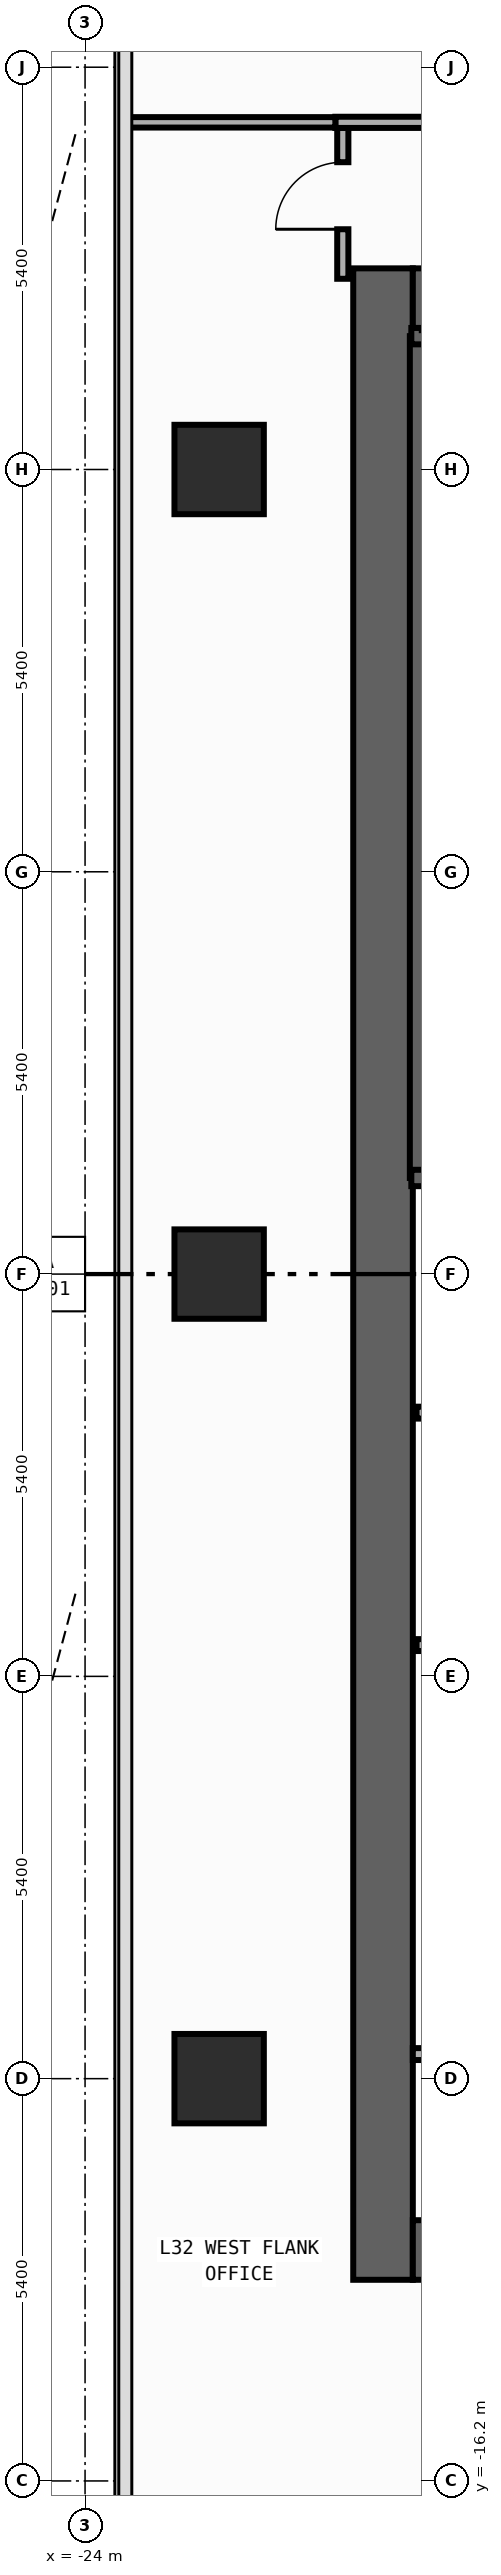
"""IFC4 building model, lengths in metres.
Left out: names, types, materials, properties, quantities, classifications, styles, units other than length and angle.
Written with IfcOpenShell. Run it as: python <this file> out.ifc"""

import sys

from ifc_helpers import new_model, si_unit, direction, frame, frame_2d, origin, origin_2d, place, context, subcontext, project, spatial, rectangle, extrude, element, fill, save


model = new_model("IFC4")
c1 = context("Model", 3, precision=1e-05, world=origin(), true_north=direction((0.0, 1.0)))
c2 = subcontext(c1, "Body", "Model", "MODEL_VIEW")
j1 = project(units=[si_unit("LENGTHUNIT", "METRE"), si_unit("PLANEANGLEUNIT", "RADIAN")], contexts=[c1])
p1 = place(None, origin())
s1 = spatial("IfcSite", under=j1, at=p1, CompositionType="ELEMENT")
p2 = place(p1, origin())
s2 = spatial("IfcBuilding", under=s1, at=p2, CompositionType="ELEMENT")
p3 = place(p2, frame((0.0, 0.0, 139.4)))
s3 = spatial("IfcBuildingStorey", under=s2, at=p3, CompositionType="ELEMENT", Elevation=139.4)
p4 = place(p3, frame((-20.0, -13.5, 0.0), z_axis=(0.0, 0.0, 1.0), x_axis=(0.0, 1.0, 0.0)))
e1 = element("IfcWall", 1, at=p4, inside=s3, PredefinedType="SHEAR", context=c2, shape_type="SweptSolid", body=[
    extrude(rectangle(XDim=27.0, YDim=0.8, at=frame_2d((13.5, 0.0))), origin(), (0.0, 0.0, 1.0), 3.94),
])
for number, where, z_axis, x_axis in (
    (2, (-19.6, -13.1, 0.0), (0.0, 0.0, 1.0), (1.0, 0.0, 0.0)),
    (3, (-19.6, 13.1, 0.0), (0.0, 0.0, 1.0), (1.0, 0.0, 0.0)),
):
    element("IfcWall", number, at=place(p3, frame(where, z_axis=z_axis, x_axis=x_axis)), inside=s3, PredefinedType="SHEAR", context=c2, shape_type="SweptSolid", body=[
        extrude(rectangle(XDim=6.8, YDim=0.8, at=frame_2d((3.4, 0.0))), origin(), (0.0, 0.0, 1.0), 3.94),
    ])
p5 = place(p3, frame((-19.53, 1.29, 0.0), z_axis=(0.0, 0.0, 1.0), x_axis=(0.0, 1.0, 0.0)))
e4 = element("IfcWall", 4, at=p5, inside=s3, PredefinedType="SHEAR", context=c2, shape_type="SweptSolid", body=[
    extrude(rectangle(XDim=11.3, YDim=0.22, at=frame_2d((5.65, 0.0))), origin(), (0.0, 0.0, 1.0), 3.94),
])
p6 = place(p3, frame((-19.62, 12.59, 0.0), z_axis=(0.0, 0.0, 1.0), x_axis=(1.0, 0.0, 0.0)))
e5 = element("IfcWall", 5, at=p6, inside=s3, PredefinedType="SHEAR", context=c2, shape_type="SweptSolid", body=[
    extrude(rectangle(XDim=3.915, YDim=0.22, at=frame_2d((1.958, 0.0))), origin(), (0.0, 0.0, 1.0), 3.94),
])
p7 = place(p3, frame((-19.62, 1.29, 0.0), z_axis=(0.0, 0.0, 1.0), x_axis=(1.0, 0.0, 0.0)))
e6 = element("IfcWall", 6, at=p7, inside=s3, PredefinedType="SHEAR", context=c2, shape_type="SweptSolid", body=[
    extrude(rectangle(XDim=3.915, YDim=0.22, at=frame_2d((1.958, 0.0))), origin(), (0.0, 0.0, 1.0), 3.94),
])
p8 = place(p7, frame((1.08, 0.0, 0.0)))
e7 = element("IfcOpeningElement", 7, at=p8, cuts=e6, PredefinedType="OPENING", context=c2, shape_type="SweptSolid", body=[
    extrude(rectangle(XDim=1.1, YDim=2.2, at=frame_2d((0.55, 1.1))), frame((0.0, 0.12, 0.0), z_axis=(0.0, -1.0, 0.0), x_axis=(1.0, 0.0, 0.0)), (0.0, 0.0, 1.0), 0.24),
])
for number, where, z_axis, x_axis in (
    (8, (-22.2, -10.8, 0.0), (0.0, 0.0, 1.0), (1.0, 0.0, 0.0)),
    (9, (-22.2, 0.0, 0.0), (0.0, 0.0, 1.0), (1.0, 0.0, 0.0)),
    (10, (-22.2, 10.8, 0.0), (0.0, 0.0, 1.0), (1.0, 0.0, 0.0)),
):
    element("IfcColumn", number, at=place(p3, frame(where, z_axis=z_axis, x_axis=x_axis)), inside=s3, PredefinedType="COLUMN", context=c2, shape_type="SweptSolid", body=[
        extrude(rectangle(XDim=1.2, YDim=1.2, at=origin_2d()), origin(), (0.0, 0.0, 1.0), 4.2),
    ])
p9 = place(p3, frame((-19.55, -1.86, 0.0), z_axis=(0.0, 0.0, 1.0), x_axis=(1.0, 0.0, 0.0)))
e11 = element("IfcWall", 11, at=p9, inside=s3, PredefinedType="STANDARD", context=c2, shape_type="SweptSolid", body=[
    extrude(rectangle(XDim=3.8, YDim=0.16, at=frame_2d((1.9, 0.0))), origin(), (0.0, 0.0, 1.0), 3.94),
])
p10 = place(p9, frame((1.18, 0.0, 0.0)))
e12 = element("IfcOpeningElement", 12, at=p10, cuts=e11, PredefinedType="OPENING", context=c2, shape_type="SweptSolid", body=[
    extrude(rectangle(XDim=1.15, YDim=2.2, at=frame_2d((0.575, 1.1))), frame((0.0, 0.09, 0.0), z_axis=(0.0, -1.0, 0.0), x_axis=(1.0, 0.0, 0.0)), (0.0, 0.0, 1.0), 0.18),
])
p11 = place(p3, frame((-19.55, -4.98, 0.0), z_axis=(0.0, 0.0, 1.0), x_axis=(1.0, 0.0, 0.0)))
e13 = element("IfcWall", 13, at=p11, inside=s3, PredefinedType="STANDARD", context=c2, shape_type="SweptSolid", body=[
    extrude(rectangle(XDim=3.8, YDim=0.16, at=frame_2d((1.9, 0.0))), origin(), (0.0, 0.0, 1.0), 3.94),
])
p12 = place(p3, frame((-19.6, -10.47, 0.0), z_axis=(0.0, 0.0, 1.0), x_axis=(1.0, 0.0, 0.0)))
e14 = element("IfcWall", 14, at=p12, inside=s3, PredefinedType="PARTITIONING", context=c2, shape_type="SweptSolid", body=[
    extrude(rectangle(XDim=2.29, YDim=0.16, at=frame_2d((1.145, 0.0))), origin(), (0.0, 0.0, 1.0), 3.94),
])
p13 = place(p3, frame((-20.54, 13.36, 0.0), z_axis=(0.0, 0.0, 1.0), x_axis=(0.0, 1.0, 0.0)))
e15 = element("IfcWall", 15, at=p13, inside=s3, PredefinedType="PARTITIONING", context=c2, shape_type="SweptSolid", body=[
    extrude(rectangle(XDim=2.025, YDim=0.15, at=frame_2d((1.012, 0.0))), origin(), (0.0, 0.0, 1.0), 3.94),
])
p14 = place(p13, frame((0.665, 0.0, 0.0)))
e16 = element("IfcOpeningElement", 16, at=p14, cuts=e15, PredefinedType="OPENING", context=c2, shape_type="SweptSolid", body=[
    extrude(rectangle(XDim=0.9, YDim=2.15, at=frame_2d((0.45, 1.075))), frame((0.0, 0.085, 0.0), z_axis=(0.0, -1.0, 0.0), x_axis=(1.0, 0.0, 0.0)), (0.0, 0.0, 1.0), 0.17),
])
p15 = place(p3, frame((-20.64, 15.46, 0.0), z_axis=(0.0, 0.0, 1.0), x_axis=(1.0, 0.0, 0.0)))
e17 = element("IfcWall", 17, at=p15, inside=s3, PredefinedType="PARTITIONING", context=c2, shape_type="SweptSolid", body=[
    extrude(rectangle(XDim=5.408, YDim=0.15, at=frame_2d((2.704, 0.0))), origin(), (0.0, 0.0, 1.0), 3.94),
])
p16 = place(p15, frame((2.781, 0.0, 0.0)))
e18 = element("IfcOpeningElement", 18, at=p16, cuts=e17, PredefinedType="OPENING", context=c2, shape_type="SweptSolid", body=[
    extrude(rectangle(XDim=0.9, YDim=2.15, at=frame_2d((0.45, 1.075))), frame((0.0, 0.085, 0.0), z_axis=(0.0, -1.0, 0.0), x_axis=(1.0, 0.0, 0.0)), (0.0, 0.0, 1.0), 0.17),
])
p17 = place(p3, frame((-23.455, 15.46, 0.0), z_axis=(0.0, 0.0, 1.0), x_axis=(1.0, 0.0, 0.0)))
e19 = element("IfcWall", 19, at=p17, inside=s3, PredefinedType="PARTITIONING", context=c2, shape_type="SweptSolid", body=[
    extrude(rectangle(XDim=2.815, YDim=0.14, at=frame_2d((1.408, 0.0))), origin(), (0.0, 0.0, 1.0), 3.94),
])
p18 = place(p14, origin())
e20 = element("IfcDoor", 20, at=p18, inside=s3, OperationType="SINGLE_SWING_LEFT", PredefinedType="DOOR", context=c2, shape_type="SweptSolid", body=[
    extrude(rectangle(XDim=0.9, YDim=2.15, at=frame_2d((0.45, 1.075))), frame((0.0, 0.025, 0.0), z_axis=(0.0, -1.0, 0.0), x_axis=(1.0, 0.0, 0.0)), (0.0, 0.0, 1.0), 0.05),
])
fill(e16, e20)
save(model, sys.argv[1])
